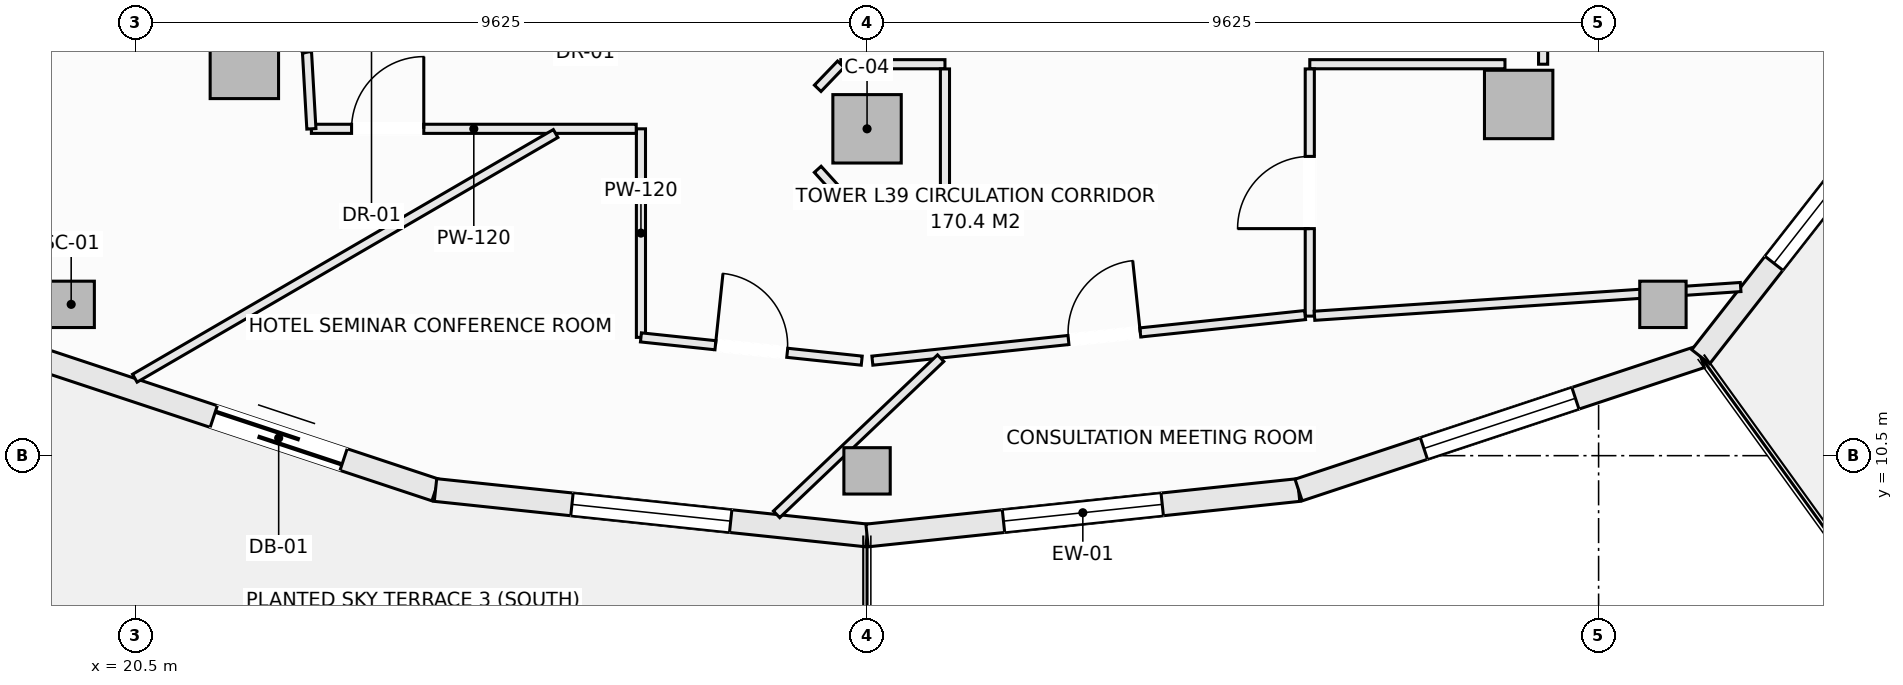
"""IFC4 building model, lengths in metres.
Left out: names, types, materials, properties, quantities, classifications, styles, units other than length and angle.
Written with IfcOpenShell. Run it as: python <this file> out.ifc"""

import sys

from ifc_helpers import new_model, si_unit, direction, frame, frame_2d, origin, origin_2d, place, context, subcontext, project, spatial, rectangle, hollow_rectangle, extrude, element, fill, save


model = new_model("IFC4")
c1 = context("Model", 3, precision=1e-05, world=origin(), true_north=direction((0.0, 1.0)))
c2 = subcontext(c1, "Body", "Model", "MODEL_VIEW")
j1 = project(units=[si_unit("LENGTHUNIT", "METRE"), si_unit("PLANEANGLEUNIT", "RADIAN")], contexts=[c1])
p1 = place(None, origin())
s1 = spatial("IfcSite", under=j1, at=p1, CompositionType="ELEMENT")
p2 = place(p1, origin())
s2 = spatial("IfcBuilding", under=s1, at=p2, CompositionType="ELEMENT")
p3 = place(p2, frame((0.0, 0.0, 152.9)))
s3 = spatial("IfcBuildingStorey", under=s2, at=p3, CompositionType="ELEMENT", Elevation=152.9)
for number, where, z_axis, x_axis in (
    (1, (19.654, 12.49, -0.27), (0.0, 0.0, 1.0), (1.0, 0.0, 0.0)),
    (2, (30.125, 10.3, -0.27), (0.0, 0.0, 1.0), (1.0, 0.0, 0.0)),
    (3, (40.596, 12.49, -0.27), (0.0, 0.0, 1.0), (1.0, 0.0, 0.0)),
):
    element("IfcColumn", number, at=place(p3, frame(where, z_axis=z_axis, x_axis=x_axis)), inside=s3, PredefinedType="COLUMN", context=c2, shape_type="SweptSolid", body=[
        extrude(hollow_rectangle(XDim=0.61, YDim=0.61, WallThickness=0.025, at=origin_2d()), origin(), (0.0, 0.0, 1.0), 3.4),
    ])
for number, where, z_axis, x_axis in (
    (4, (21.932, 15.648, -0.27), (0.0, 0.0, 1.0), (1.0, 0.0, 0.0)),
    (5, (30.125, 14.8, -0.27), (0.0, 0.0, 1.0), (1.0, 0.0, 0.0)),
    (6, (38.698, 15.121, -0.27), (0.0, 0.0, 1.0), (1.0, 0.0, 0.0)),
):
    element("IfcColumn", number, at=place(p3, frame(where, z_axis=z_axis, x_axis=x_axis)), inside=s3, PredefinedType="COLUMN", context=c2, shape_type="SweptSolid", body=[
        extrude(rectangle(XDim=0.9, YDim=0.9, at=origin_2d()), origin(), (0.0, 0.0, 1.0), 3.4),
    ])
p4 = place(p3, frame((19.156, 11.801, 0.0), z_axis=(0.0, 0.0, 1.0), x_axis=(0.949246811547, -0.314532177636, 0.0)))
e7 = element("IfcWall", 7, at=p4, inside=s3, PredefinedType="SOLIDWALL", context=c2, shape_type="SweptSolid", body=[
    extrude(rectangle(XDim=5.574, YDim=0.3, at=frame_2d((2.787, 0.0))), origin(), (0.0, 0.0, 1.0), 2.653),
])
p5 = place(p4, frame((2.5, 0.0, 0.0)))
e8 = element("IfcOpeningElement", 8, at=p5, cuts=e7, PredefinedType="OPENING", context=c2, shape_type="SweptSolid", body=[
    extrude(rectangle(XDim=1.8, YDim=2.25, at=frame_2d((0.9, 1.125))), frame((0.0, 0.16, 0.0), z_axis=(0.0, -1.0, 0.0), x_axis=(1.0, 0.0, 0.0)), (0.0, 0.0, 1.0), 0.32),
])
p6 = place(p3, frame((24.447, 10.048, 0.0), z_axis=(0.0, 0.0, 1.0), x_axis=(0.994496545245, -0.104769372887, 0.0)))
e9 = element("IfcWall", 9, at=p6, inside=s3, PredefinedType="SOLIDWALL", context=c2, shape_type="SweptSolid", body=[
    extrude(rectangle(XDim=5.709, YDim=0.3, at=frame_2d((2.854, 0.0))), origin(), (0.0, 0.0, 1.0), 2.653),
])
p7 = place(p6, frame((1.805, 0.0, 0.74)))
e10 = element("IfcOpeningElement", 10, at=p7, cuts=e9, PredefinedType="OPENING", context=c2, shape_type="SweptSolid", body=[
    extrude(rectangle(XDim=2.1, YDim=1.7, at=frame_2d((1.05, 0.85))), frame((0.0, 0.16, 0.0), z_axis=(0.0, -1.0, 0.0), x_axis=(1.0, 0.0, 0.0)), (0.0, 0.0, 1.0), 0.32),
])
p8 = place(p3, frame((30.125, 9.45, 0.0), z_axis=(0.0, 0.0, 1.0), x_axis=(0.994496545245, 0.104769372887, 0.0)))
e11 = element("IfcWall", 11, at=p8, inside=s3, PredefinedType="SOLIDWALL", context=c2, shape_type="SweptSolid", body=[
    extrude(rectangle(XDim=5.709, YDim=0.3, at=frame_2d((2.854, 0.0))), origin(), (0.0, 0.0, 1.0), 2.653),
])
p9 = place(p8, frame((1.805, 0.0, 0.74)))
e12 = element("IfcOpeningElement", 12, at=p9, cuts=e11, PredefinedType="OPENING", context=c2, shape_type="SweptSolid", body=[
    extrude(rectangle(XDim=2.1, YDim=1.7, at=frame_2d((1.05, 0.85))), frame((0.0, 0.16, 0.0), z_axis=(0.0, -1.0, 0.0), x_axis=(1.0, 0.0, 0.0)), (0.0, 0.0, 1.0), 0.32),
])
p10 = place(p3, frame((35.803, 10.048, 0.0), z_axis=(0.0, 0.0, 1.0), x_axis=(0.949246811547, 0.314532177636, 0.0)))
e13 = element("IfcWall", 13, at=p10, inside=s3, PredefinedType="SOLIDWALL", context=c2, shape_type="SweptSolid", body=[
    extrude(rectangle(XDim=5.574, YDim=0.3, at=frame_2d((2.787, 0.0))), origin(), (0.0, 0.0, 1.0), 2.653),
])
p11 = place(p10, frame((1.737, 0.0, 0.74)))
e14 = element("IfcOpeningElement", 14, at=p11, cuts=e13, PredefinedType="OPENING", context=c2, shape_type="SweptSolid", body=[
    extrude(rectangle(XDim=2.1, YDim=1.7, at=frame_2d((1.05, 0.85))), frame((0.0, 0.16, 0.0), z_axis=(0.0, -1.0, 0.0), x_axis=(1.0, 0.0, 0.0)), (0.0, 0.0, 1.0), 0.32),
])
p12 = place(p3, frame((41.094, 11.801, 0.0), z_axis=(0.0, 0.0, 1.0), x_axis=(0.616429245738, 0.787410302828, 0.0)))
e15 = element("IfcWall", 15, at=p12, inside=s3, PredefinedType="SOLIDWALL", context=c2, shape_type="SweptSolid", body=[
    extrude(rectangle(XDim=5.223, YDim=0.3, at=frame_2d((2.612, 0.0))), origin(), (0.0, 0.0, 1.0), 2.653),
])
p13 = place(p12, frame((1.562, 0.0, 0.74)))
e16 = element("IfcOpeningElement", 16, at=p13, cuts=e15, PredefinedType="OPENING", context=c2, shape_type="SweptSolid", body=[
    extrude(rectangle(XDim=2.1, YDim=1.7, at=frame_2d((1.05, 0.85))), frame((0.0, 0.16, 0.0), z_axis=(0.0, -1.0, 0.0), x_axis=(1.0, 0.0, 0.0)), (0.0, 0.0, 1.0), 0.32),
])
p14 = place(p3, frame((17.143, 9.082, 0.0), z_axis=(0.0, 0.0, 1.0), x_axis=(0.940948576924, -0.338549517184, 0.0)))
e17 = element("IfcWall", 17, at=p14, inside=s3, PredefinedType="PARAPET", context=c2, shape_type="SweptSolid", body=[
    extrude(rectangle(XDim=6.664, YDim=0.22, at=frame_2d((3.332, 0.0))), origin(), (0.0, 0.0, 1.0), 0.52),
])
p15 = place(p3, frame((27.15, 12.056, 0.0), z_axis=(0.0, 0.0, 1.0), x_axis=(0.0, 1.0, 0.0)))
e18 = element("IfcWall", 18, at=p15, inside=s3, PredefinedType="PARTITIONING", context=c2, shape_type="SweptSolid", body=[
    extrude(rectangle(XDim=2.744, YDim=0.12, at=frame_2d((1.372, 0.0))), origin(), (0.0, 0.0, 1.0), 3.13),
])
p16 = place(p3, frame((39.02, 15.65, 0.0), z_axis=(0.0, 0.0, 1.0), x_axis=(0.0, 1.0, 0.0)))
e19 = element("IfcWall", 19, at=p16, inside=s3, PredefinedType="PARTITIONING", context=c2, shape_type="SweptSolid", body=[
    extrude(rectangle(XDim=1.36, YDim=0.12, at=frame_2d((0.68, 0.0))), origin(), (0.0, 0.0, 1.0), 2.505),
])
p17 = place(p3, frame((29.78, 15.65, 0.0), z_axis=(0.0, 0.0, 1.0), x_axis=(1.0, 0.0, 0.0)))
e20 = element("IfcWall", 20, at=p17, inside=s3, PredefinedType="PARTITIONING", context=c2, shape_type="SweptSolid", body=[
    extrude(rectangle(XDim=1.37, YDim=0.12, at=frame_2d((0.685, 0.0))), origin(), (0.0, 0.0, 1.0), 3.13),
])
p18 = place(p3, frame((35.95, 15.65, 0.0), z_axis=(0.0, 0.0, 1.0), x_axis=(1.0, 0.0, 0.0)))
e21 = element("IfcWall", 21, at=p18, inside=s3, PredefinedType="PARTITIONING", context=c2, shape_type="SweptSolid", body=[
    extrude(rectangle(XDim=2.568, YDim=0.12, at=frame_2d((1.284, 0.0))), origin(), (0.0, 0.0, 1.0), 3.13),
])
p19 = place(p3, frame((35.95, 12.336, 0.0), z_axis=(0.0, 0.0, 1.0), x_axis=(0.0, 1.0, 0.0)))
e22 = element("IfcWall", 22, at=p19, inside=s3, PredefinedType="PARTITIONING", context=c2, shape_type="SweptSolid", body=[
    extrude(rectangle(XDim=3.252, YDim=0.12, at=frame_2d((1.626, 0.0))), origin(), (0.0, 0.0, 1.0), 3.13),
])
p20 = place(p19, frame((1.151, 0.0, 0.0)))
e23 = element("IfcOpeningElement", 23, at=p20, cuts=e22, PredefinedType="OPENING", context=c2, shape_type="SweptSolid", body=[
    extrude(rectangle(XDim=0.95, YDim=2.1, at=frame_2d((0.475, 1.05))), frame((0.0, 0.07, 0.0), z_axis=(0.0, -1.0, 0.0), x_axis=(1.0, 0.0, 0.0)), (0.0, 0.0, 1.0), 0.14),
])
p21 = place(p3, frame((30.195, 11.75, 0.0), z_axis=(0.0, 0.0, 1.0), x_axis=(0.994498907508, 0.104746947287, 0.0)))
e24 = element("IfcWall", 24, at=p21, inside=s3, PredefinedType="PARTITIONING", context=c2, shape_type="SweptSolid", body=[
    extrude(rectangle(XDim=5.724, YDim=0.12, at=frame_2d((2.862, 0.0))), origin(), (0.0, 0.0, 1.0), 3.13),
])
p22 = place(p21, frame((2.594, 0.0, 0.0)))
e25 = element("IfcOpeningElement", 25, at=p22, cuts=e24, PredefinedType="OPENING", context=c2, shape_type="SweptSolid", body=[
    extrude(rectangle(XDim=0.95, YDim=2.1, at=frame_2d((0.475, 1.05))), frame((0.0, 0.07, 0.0), z_axis=(0.0, -1.0, 0.0), x_axis=(1.0, 0.0, 0.0)), (0.0, 0.0, 1.0), 0.14),
])
p23 = place(p3, frame((27.15, 12.056, 0.0), z_axis=(0.0, 0.0, 1.0), x_axis=(0.994501330468, -0.104723940422, 0.0)))
e26 = element("IfcWall", 26, at=p23, inside=s3, PredefinedType="PARTITIONING", context=c2, shape_type="SweptSolid", body=[
    extrude(rectangle(XDim=2.921, YDim=0.12, at=frame_2d((1.46, 0.0))), origin(), (0.0, 0.0, 1.0), 3.13),
])
p24 = place(p23, frame((0.986, 0.0, 0.0)))
e27 = element("IfcOpeningElement", 27, at=p24, cuts=e26, PredefinedType="OPENING", context=c2, shape_type="SweptSolid", body=[
    extrude(rectangle(XDim=0.95, YDim=2.1, at=frame_2d((0.475, 1.05))), frame((0.0, 0.07, 0.0), z_axis=(0.0, -1.0, 0.0), x_axis=(1.0, 0.0, 0.0)), (0.0, 0.0, 1.0), 0.14),
])
p25 = place(p3, frame((22.814, 14.8, 0.0), z_axis=(0.0, 0.0, 1.0), x_axis=(1.0, 0.0, 0.0)))
e28 = element("IfcWall", 28, at=p25, inside=s3, PredefinedType="PARTITIONING", context=c2, shape_type="SweptSolid", body=[
    extrude(rectangle(XDim=4.274, YDim=0.12, at=frame_2d((2.137, 0.0))), origin(), (0.0, 0.0, 1.0), 3.13),
])
p26 = place(p25, frame((0.529, 0.0, 0.0)))
e29 = element("IfcOpeningElement", 29, at=p26, cuts=e28, PredefinedType="OPENING", context=c2, shape_type="SweptSolid", body=[
    extrude(rectangle(XDim=0.95, YDim=2.1, at=frame_2d((0.475, 1.05))), frame((0.0, 0.07, 0.0), z_axis=(0.0, -1.0, 0.0), x_axis=(1.0, 0.0, 0.0)), (0.0, 0.0, 1.0), 0.14),
])
p27 = place(p3, frame((22.756, 15.811, 0.0), z_axis=(0.0, 0.0, 1.0), x_axis=(0.057139047697, -0.998366230012, 0.0)))
e30 = element("IfcWall", 30, at=p27, inside=s3, PredefinedType="PARTITIONING", context=c2, shape_type="SweptSolid", body=[
    extrude(rectangle(XDim=1.013, YDim=0.12, at=frame_2d((0.506, 0.0))), origin(), (0.0, 0.0, 1.0), 3.13),
])
p28 = place(p3, frame((22.353, 16.958, 0.0), z_axis=(0.0, 0.0, 1.0), x_axis=(0.331370038458, -0.943500873138, 0.0)))
e31 = element("IfcWall", 31, at=p28, inside=s3, PredefinedType="PARTITIONING", context=c2, shape_type="SweptSolid", body=[
    extrude(rectangle(XDim=1.216, YDim=0.12, at=frame_2d((0.608, 0.0))), origin(), (0.0, 0.0, 1.0), 3.13),
])
p29 = place(p3, frame((29.476, 15.333, 0.0), z_axis=(0.0, 0.0, 1.0), x_axis=(0.692219273951, 0.721687243043, 0.0)))
e32 = element("IfcWall", 32, at=p29, inside=s3, PredefinedType="PARTITIONING", context=c2, shape_type="SweptSolid", body=[
    extrude(rectangle(XDim=0.439, YDim=0.12, at=frame_2d((0.22, 0.0))), origin(), (0.0, 0.0, 1.0), 3.13),
])
p30 = place(p3, frame((29.476, 14.267, 0.0), z_axis=(0.0, 0.0, 1.0), x_axis=(0.670659392016, -0.741765448037, 0.0)))
e33 = element("IfcWall", 33, at=p30, inside=s3, PredefinedType="PARTITIONING", context=c2, shape_type="SweptSolid", body=[
    extrude(rectangle(XDim=0.453, YDim=0.12, at=frame_2d((0.227, 0.0))), origin(), (0.0, 0.0, 1.0), 3.13),
])
p31 = place(p3, frame((29.78, 13.85, 0.0), z_axis=(0.0, 0.0, 1.0), x_axis=(1.0, 0.0, 0.0)))
e34 = element("IfcWall", 34, at=p31, inside=s3, PredefinedType="PARTITIONING", context=c2, shape_type="SweptSolid", body=[
    extrude(rectangle(XDim=1.37, YDim=0.12, at=frame_2d((0.685, 0.0))), origin(), (0.0, 0.0, 1.0), 3.13),
])
p32 = place(p3, frame((31.15, 13.912, 0.0), z_axis=(0.0, 0.0, 1.0), x_axis=(0.0, 1.0, 0.0)))
e35 = element("IfcWall", 35, at=p32, inside=s3, PredefinedType="PARTITIONING", context=c2, shape_type="SweptSolid", body=[
    extrude(rectangle(XDim=1.676, YDim=0.12, at=frame_2d((0.838, 0.0))), origin(), (0.0, 0.0, 1.0), 3.13),
])
p33 = place(p3, frame((20.491, 11.519, 0.0), z_axis=(0.0, 0.0, 1.0), x_axis=(0.864495629624, 0.502640334991, 0.0)))
e36 = element("IfcWall", 36, at=p33, inside=s3, PredefinedType="PARTITIONING", context=c2, shape_type="SweptSolid", body=[
    extrude(rectangle(XDim=6.404, YDim=0.12, at=frame_2d((3.202, 0.0))), origin(), (0.0, 0.0, 1.0), 3.13),
])
p34 = place(p3, frame((28.935, 9.728, 0.0), z_axis=(0.0, 0.0, 1.0), x_axis=(0.724541098321, 0.689231598843, 0.0)))
e37 = element("IfcWall", 37, at=p34, inside=s3, PredefinedType="PARTITIONING", context=c2, shape_type="SweptSolid", body=[
    extrude(rectangle(XDim=2.98, YDim=0.12, at=frame_2d((1.49, 0.0))), origin(), (0.0, 0.0, 1.0), 2.703),
])
p35 = place(p3, frame((36.012, 12.34, 0.0), z_axis=(0.0, 0.0, 1.0), x_axis=(0.997733146572, 0.067294637466, 0.0)))
e38 = element("IfcWall", 38, at=p35, inside=s3, PredefinedType="PARTITIONING", context=c2, shape_type="SweptSolid", body=[
    extrude(rectangle(XDim=5.62, YDim=0.12, at=frame_2d((2.81, 0.0))), origin(), (0.0, 0.0, 1.0), 2.653),
])
p36 = place(p5, frame((1.8, 0.0, 0.0), z_axis=(0.0, 0.0, 1.0), x_axis=(-1.0, 0.0, 0.0)))
e39 = element("IfcDoor", 39, at=p36, inside=s3, OperationType="SLIDING_TO_LEFT", PredefinedType="DOOR", context=c2, shape_type="SweptSolid", body=[
    extrude(rectangle(XDim=1.8, YDim=2.25, at=frame_2d((0.9, 1.125))), frame((0.0, 0.025, 0.0), z_axis=(0.0, -1.0, 0.0), x_axis=(1.0, 0.0, 0.0)), (0.0, 0.0, 1.0), 0.05),
])
fill(e8, e39)
p37 = place(p7, origin())
e40 = element("IfcWindow", 40, at=p37, inside=s3, PartitioningType="SINGLE_PANEL", PredefinedType="WINDOW", context=c2, shape_type="SweptSolid", body=[
    extrude(rectangle(XDim=2.1, YDim=1.7, at=frame_2d((1.05, 0.85))), frame((0.0, 0.03, 0.0), z_axis=(0.0, -1.0, 0.0), x_axis=(1.0, 0.0, 0.0)), (0.0, 0.0, 1.0), 0.06),
])
fill(e10, e40)
p38 = place(p9, origin())
e41 = element("IfcWindow", 41, at=p38, inside=s3, PartitioningType="SINGLE_PANEL", PredefinedType="WINDOW", context=c2, shape_type="SweptSolid", body=[
    extrude(rectangle(XDim=2.1, YDim=1.7, at=frame_2d((1.05, 0.85))), frame((0.0, 0.03, 0.0), z_axis=(0.0, -1.0, 0.0), x_axis=(1.0, 0.0, 0.0)), (0.0, 0.0, 1.0), 0.06),
])
fill(e12, e41)
p39 = place(p11, origin())
e42 = element("IfcWindow", 42, at=p39, inside=s3, PartitioningType="SINGLE_PANEL", PredefinedType="WINDOW", context=c2, shape_type="SweptSolid", body=[
    extrude(rectangle(XDim=2.1, YDim=1.7, at=frame_2d((1.05, 0.85))), frame((0.0, 0.03, 0.0), z_axis=(0.0, -1.0, 0.0), x_axis=(1.0, 0.0, 0.0)), (0.0, 0.0, 1.0), 0.06),
])
fill(e14, e42)
p40 = place(p13, origin())
e43 = element("IfcWindow", 43, at=p40, inside=s3, PartitioningType="SINGLE_PANEL", PredefinedType="WINDOW", context=c2, shape_type="SweptSolid", body=[
    extrude(rectangle(XDim=2.1, YDim=1.7, at=frame_2d((1.05, 0.85))), frame((0.0, 0.03, 0.0), z_axis=(0.0, -1.0, 0.0), x_axis=(1.0, 0.0, 0.0)), (0.0, 0.0, 1.0), 0.06),
])
fill(e16, e43)
p41 = place(p26, origin())
e44 = element("IfcDoor", 44, at=p41, inside=s3, OperationType="SINGLE_SWING_RIGHT", PredefinedType="DOOR", context=c2, shape_type="SweptSolid", body=[
    extrude(rectangle(XDim=0.95, YDim=2.1, at=frame_2d((0.475, 1.05))), frame((0.0, 0.025, 0.0), z_axis=(0.0, -1.0, 0.0), x_axis=(1.0, 0.0, 0.0)), (0.0, 0.0, 1.0), 0.05),
])
fill(e29, e44)
p42 = place(p24, origin())
e45 = element("IfcDoor", 45, at=p42, inside=s3, OperationType="SINGLE_SWING_LEFT", PredefinedType="DOOR", context=c2, shape_type="SweptSolid", body=[
    extrude(rectangle(XDim=0.95, YDim=2.1, at=frame_2d((0.475, 1.05))), frame((0.0, 0.025, 0.0), z_axis=(0.0, -1.0, 0.0), x_axis=(1.0, 0.0, 0.0)), (0.0, 0.0, 1.0), 0.05),
])
fill(e27, e45)
p43 = place(p22, origin())
e46 = element("IfcDoor", 46, at=p43, inside=s3, OperationType="SINGLE_SWING_RIGHT", PredefinedType="DOOR", context=c2, shape_type="SweptSolid", body=[
    extrude(rectangle(XDim=0.95, YDim=2.1, at=frame_2d((0.475, 1.05))), frame((0.0, 0.025, 0.0), z_axis=(0.0, -1.0, 0.0), x_axis=(1.0, 0.0, 0.0)), (0.0, 0.0, 1.0), 0.05),
])
fill(e25, e46)
p44 = place(p20, origin())
e47 = element("IfcDoor", 47, at=p44, inside=s3, OperationType="SINGLE_SWING_LEFT", PredefinedType="DOOR", context=c2, shape_type="SweptSolid", body=[
    extrude(rectangle(XDim=0.95, YDim=2.1, at=frame_2d((0.475, 1.05))), frame((0.0, 0.025, 0.0), z_axis=(0.0, -1.0, 0.0), x_axis=(1.0, 0.0, 0.0)), (0.0, 0.0, 1.0), 0.05),
])
fill(e23, e47)
save(model, sys.argv[1])
